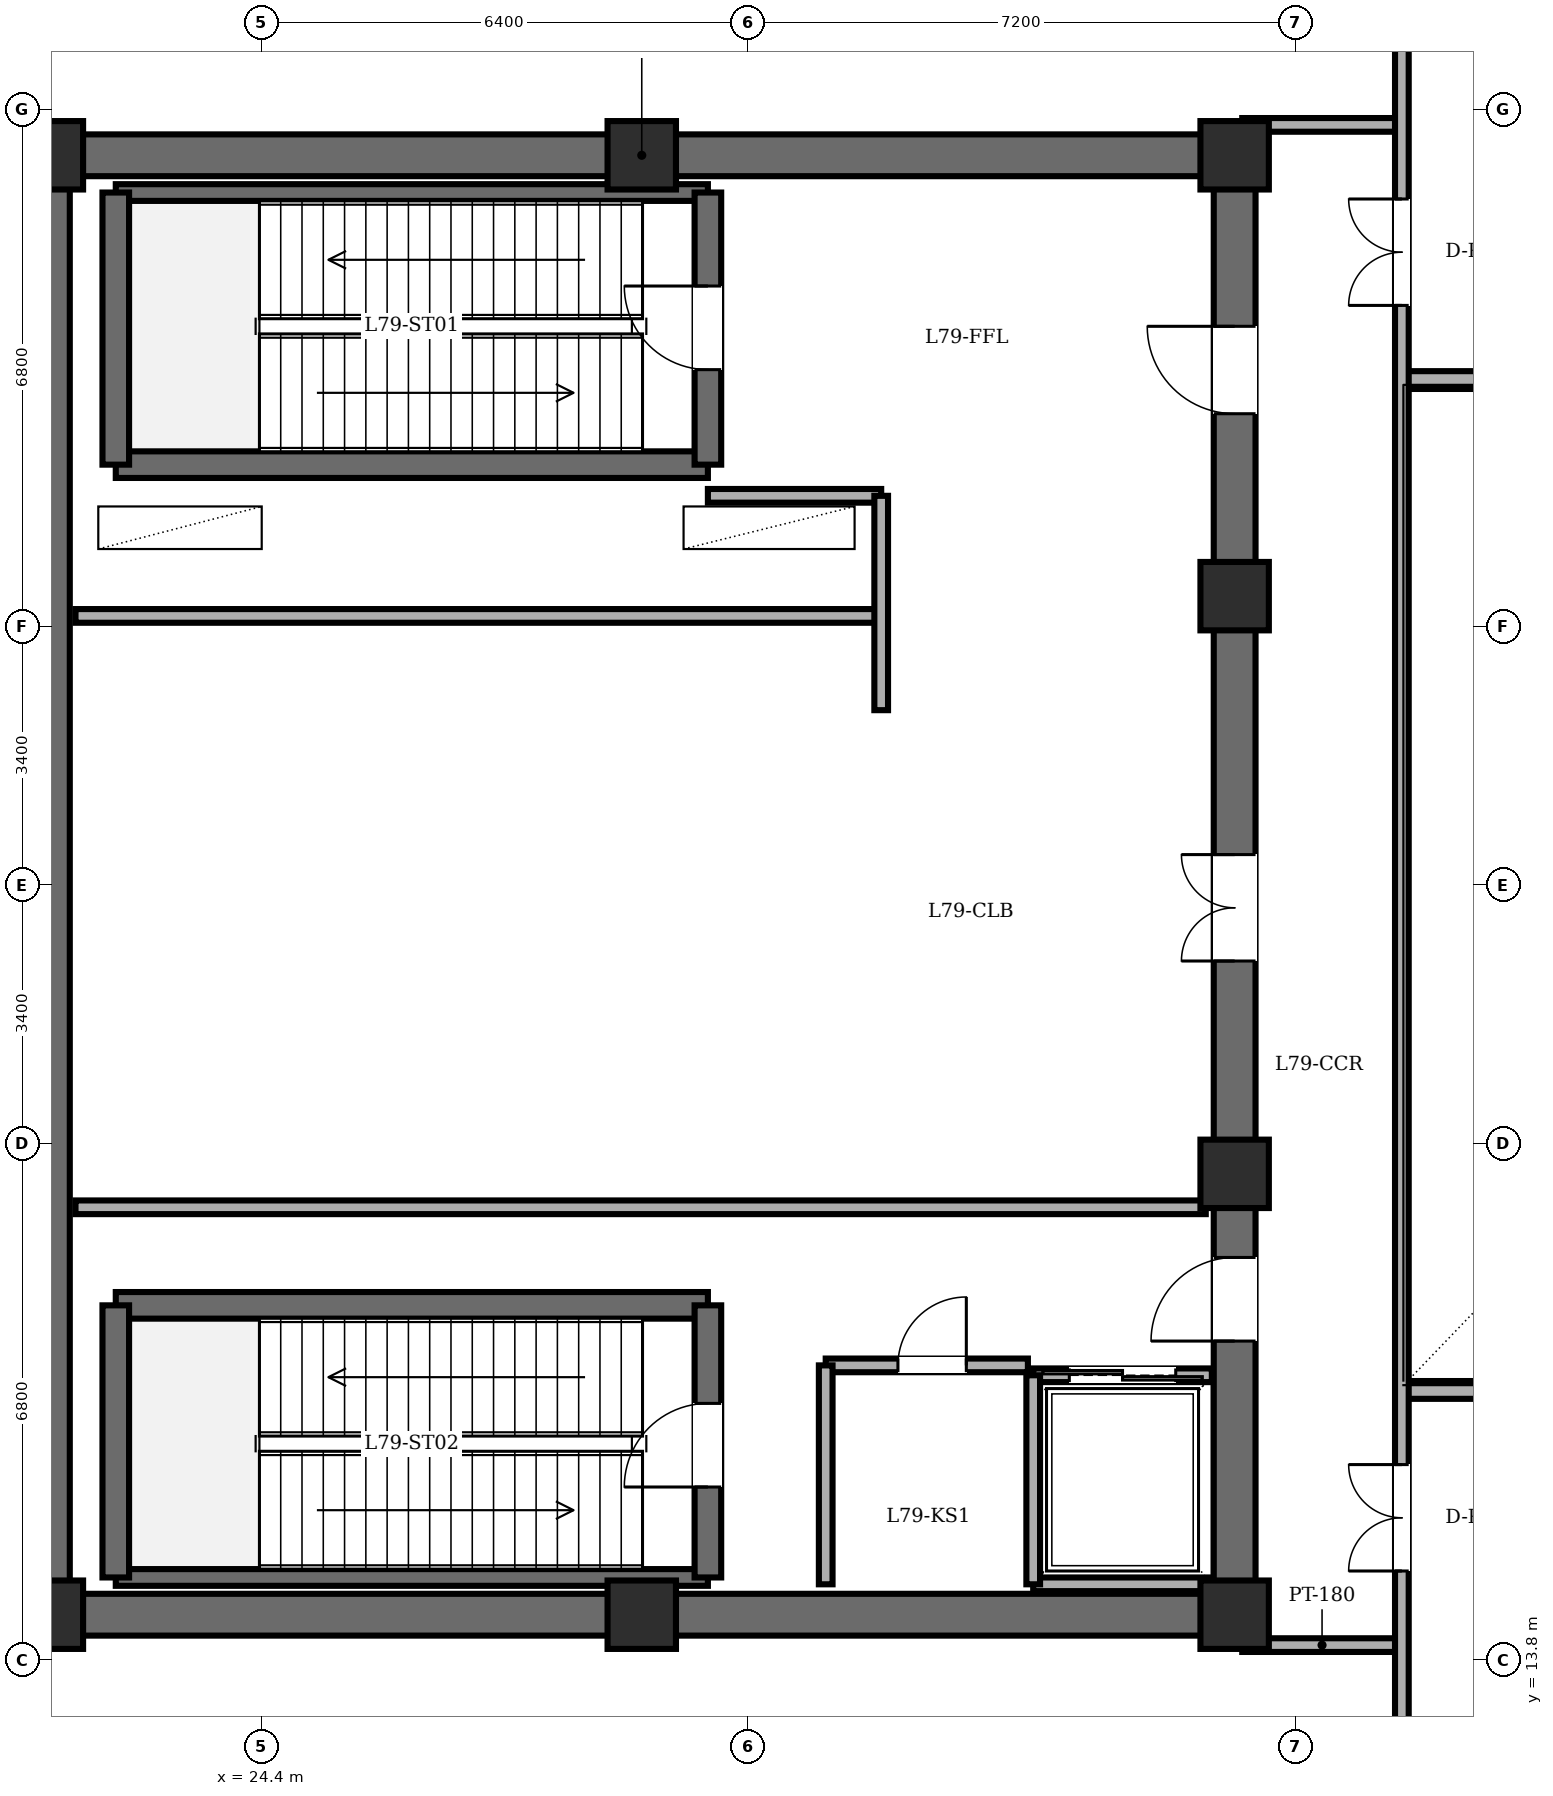
"""IFC4 building model, lengths in metres.
Left out: names, types, materials, properties, quantities, classifications, styles, units other than length and angle.
Written with IfcOpenShell. Run it as: python <this file> out.ifc"""

import sys

from ifc_helpers import new_model, si_unit, direction, frame, frame_2d, origin, origin_2d, place, context, subcontext, project, spatial, rectangle, extrude, element, fill, save


model = new_model("IFC4")
c1 = context("Model", 3, precision=1e-05, world=origin(), true_north=direction((0.0, 1.0)))
c2 = subcontext(c1, "Body", "Model", "MODEL_VIEW")
j1 = project(units=[si_unit("LENGTHUNIT", "METRE"), si_unit("PLANEANGLEUNIT", "RADIAN")], contexts=[c1])
p1 = place(None, origin())
s1 = spatial("IfcSite", under=j1, at=p1, CompositionType="ELEMENT")
p2 = place(p1, origin())
s2 = spatial("IfcBuilding", under=s1, at=p2, CompositionType="ELEMENT")
p3 = place(p2, frame((0.0, 0.0, 308.0)))
s3 = spatial("IfcBuildingStorey", under=s2, at=p3, CompositionType="ELEMENT", Elevation=308.0)
for number, where, z_axis, x_axis in (
    (1, (21.6, 14.4, 0.0), (0.0, 0.0, 1.0), (1.0, 0.0, 0.0)),
    (2, (29.4, 14.4, 0.0), (0.0, 0.0, 1.0), (1.0, 0.0, 0.0)),
    (3, (37.2, 14.4, 0.0), (0.0, 0.0, 1.0), (1.0, 0.0, 0.0)),
    (4, (37.2, 20.2, 0.0), (0.0, 0.0, 1.0), (1.0, 0.0, 0.0)),
    (5, (37.2, 27.8, 0.0), (0.0, 0.0, 1.0), (1.0, 0.0, 0.0)),
    (6, (37.2, 33.6, 0.0), (0.0, 0.0, 1.0), (1.0, 0.0, 0.0)),
    (7, (29.4, 33.6, 0.0), (0.0, 0.0, 1.0), (1.0, 0.0, 0.0)),
    (8, (21.6, 33.6, 0.0), (0.0, 0.0, 1.0), (1.0, 0.0, 0.0)),
):
    element("IfcColumn", number, at=place(p3, frame(where, z_axis=z_axis, x_axis=x_axis)), inside=s3, PredefinedType="COLUMN", context=c2, shape_type="SweptSolid", body=[
        extrude(rectangle(XDim=0.9, YDim=0.9, at=origin_2d()), origin(), (0.0, 0.0, 1.0), 7.2),
    ])
p4 = place(p3, frame((21.6, 14.4, 0.0), z_axis=(0.0, 0.0, 1.0), x_axis=(0.0, 1.0, 0.0)))
e9 = element("IfcWall", 9, at=p4, inside=s3, PredefinedType="SHEAR", context=c2, shape_type="SweptSolid", body=[
    extrude(rectangle(XDim=19.2, YDim=0.55, at=frame_2d((9.6, 0.0))), origin(), (0.0, 0.0, 1.0), 6.95),
])
for number, where, z_axis, x_axis in (
    (10, (21.6, 33.6, 0.0), (0.0, 0.0, 1.0), (1.0, 0.0, 0.0)),
    (11, (37.2, 14.4, 0.0), (0.0, 0.0, 1.0), (-1.0, 0.0, 0.0)),
):
    element("IfcWall", number, at=place(p3, frame(where, z_axis=z_axis, x_axis=x_axis)), inside=s3, PredefinedType="SHEAR", context=c2, shape_type="SweptSolid", body=[
        extrude(rectangle(XDim=15.6, YDim=0.55, at=frame_2d((7.8, 0.0))), origin(), (0.0, 0.0, 1.0), 6.95),
    ])
p5 = place(p3, frame((37.2, 14.4, 0.0), z_axis=(0.0, 0.0, 1.0), x_axis=(0.0, 1.0, 0.0)))
e12 = element("IfcWall", 12, at=p5, inside=s3, PredefinedType="SHEAR", context=c2, shape_type="SweptSolid", body=[
    extrude(rectangle(XDim=19.2, YDim=0.55, at=frame_2d((9.6, 0.0))), origin(), (0.0, 0.0, 1.0), 6.95),
])
p6 = place(p5, frame((15.8, 0.0, 0.0)))
e13 = element("IfcOpeningElement", 13, at=p6, cuts=e12, PredefinedType="OPENING", context=c2, shape_type="SweptSolid", body=[
    extrude(rectangle(XDim=1.15, YDim=2.15, at=frame_2d((0.575, 1.075))), frame((0.0, 0.285, 0.0), z_axis=(0.0, -1.0, 0.0), x_axis=(1.0, 0.0, 0.0)), (0.0, 0.0, 1.0), 0.57),
])
p7 = place(p5, frame((3.6, 0.0, 0.0)))
e14 = element("IfcOpeningElement", 14, at=p7, cuts=e12, PredefinedType="OPENING", context=c2, shape_type="SweptSolid", body=[
    extrude(rectangle(XDim=1.1, YDim=2.15, at=frame_2d((0.55, 1.075))), frame((0.0, 0.285, 0.0), z_axis=(0.0, -1.0, 0.0), x_axis=(1.0, 0.0, 0.0)), (0.0, 0.0, 1.0), 0.57),
])
p8 = place(p5, frame((8.6, 0.0, 0.0)))
e15 = element("IfcOpeningElement", 15, at=p8, cuts=e12, PredefinedType="OPENING", context=c2, shape_type="SweptSolid", body=[
    extrude(rectangle(XDim=1.4, YDim=2.25, at=frame_2d((0.7, 1.125))), frame((0.0, 0.285, 0.0), z_axis=(0.0, -1.0, 0.0), x_axis=(1.0, 0.0, 0.0)), (0.0, 0.0, 1.0), 0.57),
])
p9 = place(p3, frame((22.48, 29.53, 0.0), z_axis=(0.0, 0.0, 1.0), x_axis=(1.0, 0.0, 0.0)))
e16 = element("IfcWall", 16, at=p9, inside=s3, PredefinedType="SOLIDWALL", context=c2, shape_type="SweptSolid", body=[
    extrude(rectangle(XDim=7.79, YDim=0.35, at=frame_2d((3.895, 0.0))), origin(), (0.0, 0.0, 1.0), 6.95),
])
p10 = place(p3, frame((22.48, 33.11, 0.0), z_axis=(0.0, 0.0, 1.0), x_axis=(1.0, 0.0, 0.0)))
e17 = element("IfcWall", 17, at=p10, inside=s3, PredefinedType="PARTITIONING", context=c2, shape_type="SweptSolid", body=[
    extrude(rectangle(XDim=7.79, YDim=0.22, at=frame_2d((3.895, 0.0))), origin(), (0.0, 0.0, 1.0), 6.95),
])
p11 = place(p3, frame((22.48, 29.53, 0.0), z_axis=(0.0, 0.0, 1.0), x_axis=(0.0, 1.0, 0.0)))
e18 = element("IfcWall", 18, at=p11, inside=s3, PredefinedType="SOLIDWALL", context=c2, shape_type="SweptSolid", body=[
    extrude(rectangle(XDim=3.58, YDim=0.35, at=frame_2d((1.79, 0.0))), origin(), (0.0, 0.0, 1.0), 6.95),
])
p12 = place(p3, frame((30.27, 29.53, 0.0), z_axis=(0.0, 0.0, 1.0), x_axis=(0.0, 1.0, 0.0)))
e19 = element("IfcWall", 19, at=p12, inside=s3, PredefinedType="SOLIDWALL", context=c2, shape_type="SweptSolid", body=[
    extrude(rectangle(XDim=3.58, YDim=0.35, at=frame_2d((1.79, 0.0))), origin(), (0.0, 0.0, 1.0), 6.95),
])
p13 = place(p12, frame((1.25, 0.0, 0.0)))
e20 = element("IfcOpeningElement", 20, at=p13, cuts=e19, PredefinedType="OPENING", context=c2, shape_type="SweptSolid", body=[
    extrude(rectangle(XDim=1.1, YDim=2.15, at=frame_2d((0.55, 1.075))), frame((0.0, 0.185, 0.0), z_axis=(0.0, -1.0, 0.0), x_axis=(1.0, 0.0, 0.0)), (0.0, 0.0, 1.0), 0.37),
])
p14 = place(p3, frame((22.48, 18.47, 0.0), z_axis=(0.0, 0.0, 1.0), x_axis=(1.0, 0.0, 0.0)))
e21 = element("IfcWall", 21, at=p14, inside=s3, PredefinedType="SOLIDWALL", context=c2, shape_type="SweptSolid", body=[
    extrude(rectangle(XDim=7.79, YDim=0.35, at=frame_2d((3.895, 0.0))), origin(), (0.0, 0.0, 1.0), 6.95),
])
p15 = place(p3, frame((22.48, 14.89, 0.0), z_axis=(0.0, 0.0, 1.0), x_axis=(1.0, 0.0, 0.0)))
e22 = element("IfcWall", 22, at=p15, inside=s3, PredefinedType="PARTITIONING", context=c2, shape_type="SweptSolid", body=[
    extrude(rectangle(XDim=7.79, YDim=0.22, at=frame_2d((3.895, 0.0))), origin(), (0.0, 0.0, 1.0), 6.95),
])
p16 = place(p3, frame((22.48, 14.89, 0.0), z_axis=(0.0, 0.0, 1.0), x_axis=(0.0, 1.0, 0.0)))
e23 = element("IfcWall", 23, at=p16, inside=s3, PredefinedType="SOLIDWALL", context=c2, shape_type="SweptSolid", body=[
    extrude(rectangle(XDim=3.58, YDim=0.35, at=frame_2d((1.79, 0.0))), origin(), (0.0, 0.0, 1.0), 6.95),
])
p17 = place(p3, frame((30.27, 14.89, 0.0), z_axis=(0.0, 0.0, 1.0), x_axis=(0.0, 1.0, 0.0)))
e24 = element("IfcWall", 24, at=p17, inside=s3, PredefinedType="SOLIDWALL", context=c2, shape_type="SweptSolid", body=[
    extrude(rectangle(XDim=3.58, YDim=0.35, at=frame_2d((1.79, 0.0))), origin(), (0.0, 0.0, 1.0), 6.95),
])
p18 = place(p17, frame((1.19, 0.0, 0.0)))
e25 = element("IfcOpeningElement", 25, at=p18, cuts=e24, PredefinedType="OPENING", context=c2, shape_type="SweptSolid", body=[
    extrude(rectangle(XDim=1.1, YDim=2.15, at=frame_2d((0.55, 1.075))), frame((0.0, 0.185, 0.0), z_axis=(0.0, -1.0, 0.0), x_axis=(1.0, 0.0, 0.0)), (0.0, 0.0, 1.0), 0.37),
])
p19 = place(p3, frame((30.27, 29.12, 0.0), z_axis=(0.0, 0.0, 1.0), x_axis=(1.0, 0.0, 0.0)))
e26 = element("IfcWall", 26, at=p19, inside=s3, PredefinedType="PARTITIONING", context=c2, shape_type="SweptSolid", body=[
    extrude(rectangle(XDim=2.28, YDim=0.18, at=frame_2d((1.14, 0.0))), origin(), (0.0, 0.0, 1.0), 6.95),
])
p20 = place(p3, frame((21.95, 27.54, 0.0), z_axis=(0.0, 0.0, 1.0), x_axis=(1.0, 0.0, 0.0)))
e27 = element("IfcWall", 27, at=p20, inside=s3, PredefinedType="PARTITIONING", context=c2, shape_type="SweptSolid", body=[
    extrude(rectangle(XDim=10.6, YDim=0.18, at=frame_2d((5.3, 0.0))), origin(), (0.0, 0.0, 1.0), 6.95),
])
p21 = place(p3, frame((32.55, 26.3, 0.0), z_axis=(0.0, 0.0, 1.0), x_axis=(0.0, 1.0, 0.0)))
e28 = element("IfcWall", 28, at=p21, inside=s3, PredefinedType="PARTITIONING", context=c2, shape_type="SweptSolid", body=[
    extrude(rectangle(XDim=2.82, YDim=0.18, at=frame_2d((1.41, 0.0))), origin(), (0.0, 0.0, 1.0), 6.95),
])
p22 = place(p3, frame((21.95, 19.76, 0.0), z_axis=(0.0, 0.0, 1.0), x_axis=(1.0, 0.0, 0.0)))
e29 = element("IfcWall", 29, at=p22, inside=s3, PredefinedType="PARTITIONING", context=c2, shape_type="SweptSolid", body=[
    extrude(rectangle(XDim=14.87, YDim=0.18, at=frame_2d((7.435, 0.0))), origin(), (0.0, 0.0, 1.0), 6.95),
])
p23 = place(p3, frame((31.82, 17.68, 0.0), z_axis=(0.0, 0.0, 1.0), x_axis=(1.0, 0.0, 0.0)))
e30 = element("IfcWall", 30, at=p23, inside=s3, PredefinedType="PARTITIONING", context=c2, shape_type="SweptSolid", body=[
    extrude(rectangle(XDim=2.66, YDim=0.18, at=frame_2d((1.33, 0.0))), origin(), (0.0, 0.0, 1.0), 6.95),
])
p24 = place(p23, frame((0.95, 0.0, 0.0)))
e31 = element("IfcOpeningElement", 31, at=p24, cuts=e30, PredefinedType="OPENING", context=c2, shape_type="SweptSolid", body=[
    extrude(rectangle(XDim=0.9, YDim=2.05, at=frame_2d((0.45, 1.025))), frame((0.0, 0.1, 0.0), z_axis=(0.0, -1.0, 0.0), x_axis=(1.0, 0.0, 0.0)), (0.0, 0.0, 1.0), 0.2),
])
p25 = place(p3, frame((31.82, 14.8, 0.0), z_axis=(0.0, 0.0, 1.0), x_axis=(0.0, 1.0, 0.0)))
e32 = element("IfcWall", 32, at=p25, inside=s3, PredefinedType="PARTITIONING", context=c2, shape_type="SweptSolid", body=[
    extrude(rectangle(XDim=2.88, YDim=0.18, at=frame_2d((1.44, 0.0))), origin(), (0.0, 0.0, 1.0), 6.95),
])
p26 = place(p3, frame((34.55, 17.55, 0.0), z_axis=(0.0, 0.0, 1.0), x_axis=(1.0, 0.0, 0.0)))
e33 = element("IfcWall", 33, at=p26, inside=s3, PredefinedType="PARTITIONING", context=c2, shape_type="SweptSolid", body=[
    extrude(rectangle(XDim=2.35, YDim=0.18, at=frame_2d((1.175, 0.0))), origin(), (0.0, 0.0, 1.0), 6.95),
])
p27 = place(p26, frame((0.475, 0.0, 0.0)))
e34 = element("IfcOpeningElement", 34, at=p27, cuts=e33, PredefinedType="OPENING", context=c2, shape_type="SweptSolid", body=[
    extrude(rectangle(XDim=1.4, YDim=2.3, at=frame_2d((0.7, 1.15))), frame((0.0, 0.1, 0.0), z_axis=(0.0, -1.0, 0.0), x_axis=(1.0, 0.0, 0.0)), (0.0, 0.0, 1.0), 0.2),
])
p28 = place(p3, frame((36.9, 14.8, 0.0), z_axis=(0.0, 0.0, 1.0), x_axis=(-1.0, 0.0, 0.0)))
e35 = element("IfcWall", 35, at=p28, inside=s3, PredefinedType="PARTITIONING", context=c2, shape_type="SweptSolid", body=[
    extrude(rectangle(XDim=2.35, YDim=0.18, at=frame_2d((1.175, 0.0))), origin(), (0.0, 0.0, 1.0), 6.95),
])
p29 = place(p3, frame((34.55, 17.55, 0.0), z_axis=(0.0, 0.0, 1.0), x_axis=(0.0, -1.0, 0.0)))
e36 = element("IfcWall", 36, at=p29, inside=s3, PredefinedType="PARTITIONING", context=c2, shape_type="SweptSolid", body=[
    extrude(rectangle(XDim=2.75, YDim=0.18, at=frame_2d((1.375, 0.0))), origin(), (0.0, 0.0, 1.0), 6.95),
])
p30 = place(p3, frame((37.3, 14.0, 0.0), z_axis=(0.0, 0.0, 1.0), x_axis=(1.0, 0.0, 0.0)))
e37 = element("IfcWall", 37, at=p30, inside=s3, PredefinedType="PARTITIONING", context=c2, shape_type="SweptSolid", body=[
    extrude(rectangle(XDim=2.1, YDim=0.18, at=frame_2d((1.05, 0.0))), origin(), (0.0, 0.0, 1.0), 6.95),
])
p31 = place(p3, frame((39.4, 17.35, 0.0), z_axis=(0.0, 0.0, 1.0), x_axis=(1.0, 0.0, 0.0)))
e38 = element("IfcWall", 38, at=p31, inside=s3, PredefinedType="PARTITIONING", context=c2, shape_type="SweptSolid", body=[
    extrude(rectangle(XDim=29.788, YDim=0.22, at=frame_2d((14.894, 0.0))), origin(), (0.0, 0.0, 1.0), 6.432),
])
p32 = place(p3, frame((39.4, 30.65, 0.0), z_axis=(0.0, 0.0, 1.0), x_axis=(1.0, 0.0, 0.0)))
e39 = element("IfcWall", 39, at=p32, inside=s3, PredefinedType="PARTITIONING", context=c2, shape_type="SweptSolid", body=[
    extrude(rectangle(XDim=29.788, YDim=0.22, at=frame_2d((14.894, 0.0))), origin(), (0.0, 0.0, 1.0), 6.432),
])
p33 = place(p32, frame((21.336, 0.0, 0.0)))
e40 = element("IfcOpeningElement", 40, at=p33, cuts=e39, PredefinedType="OPENING", context=c2, shape_type="SweptSolid", body=[
    extrude(rectangle(XDim=1.4, YDim=2.25, at=frame_2d((0.7, 1.125))), frame((0.0, 0.12, 0.0), z_axis=(0.0, -1.0, 0.0), x_axis=(1.0, 0.0, 0.0)), (0.0, 0.0, 1.0), 0.24),
])
p34 = place(p3, frame((37.3, 34.0, 0.0), z_axis=(0.0, 0.0, 1.0), x_axis=(1.0, 0.0, 0.0)))
e41 = element("IfcWall", 41, at=p34, inside=s3, PredefinedType="PARTITIONING", context=c2, shape_type="SweptSolid", body=[
    extrude(rectangle(XDim=2.1, YDim=0.18, at=frame_2d((1.05, 0.0))), origin(), (0.0, 0.0, 1.0), 6.95),
])
p35 = place(p3, frame((39.4, 10.6, 0.0), z_axis=(0.0, 0.0, 1.0), x_axis=(0.0, 1.0, 0.0)))
e42 = element("IfcWall", 42, at=p35, inside=s3, PredefinedType="PARTITIONING", context=c2, shape_type="SweptSolid", body=[
    extrude(rectangle(XDim=26.8, YDim=0.18, at=frame_2d((13.4, 0.0))), origin(), (0.0, 0.0, 1.0), 6.95),
])
p36 = place(p35, frame((21.025, 0.0, 0.0)))
e43 = element("IfcOpeningElement", 43, at=p36, cuts=e42, PredefinedType="OPENING", context=c2, shape_type="SweptSolid", body=[
    extrude(rectangle(XDim=1.4, YDim=2.25, at=frame_2d((0.7, 1.125))), frame((0.0, 0.1, 0.0), z_axis=(0.0, -1.0, 0.0), x_axis=(1.0, 0.0, 0.0)), (0.0, 0.0, 1.0), 0.2),
])
p37 = place(p35, frame((4.375, 0.0, 0.0)))
e44 = element("IfcOpeningElement", 44, at=p37, cuts=e42, PredefinedType="OPENING", context=c2, shape_type="SweptSolid", body=[
    extrude(rectangle(XDim=1.4, YDim=2.25, at=frame_2d((0.7, 1.125))), frame((0.0, 0.1, 0.0), z_axis=(0.0, -1.0, 0.0), x_axis=(1.0, 0.0, 0.0)), (0.0, 0.0, 1.0), 0.2),
])
p38 = place(p13, origin())
e45 = element("IfcDoor", 45, at=p38, inside=s3, OperationType="SINGLE_SWING_RIGHT", PredefinedType="DOOR", context=c2, shape_type="SweptSolid", body=[
    extrude(rectangle(XDim=1.1, YDim=2.15, at=frame_2d((0.55, 1.075))), frame((0.0, 0.025, 0.0), z_axis=(0.0, -1.0, 0.0), x_axis=(1.0, 0.0, 0.0)), (0.0, 0.0, 1.0), 0.05),
])
fill(e20, e45)
p39 = place(p18, origin())
e46 = element("IfcDoor", 46, at=p39, inside=s3, OperationType="SINGLE_SWING_LEFT", PredefinedType="DOOR", context=c2, shape_type="SweptSolid", body=[
    extrude(rectangle(XDim=1.1, YDim=2.15, at=frame_2d((0.55, 1.075))), frame((0.0, 0.025, 0.0), z_axis=(0.0, -1.0, 0.0), x_axis=(1.0, 0.0, 0.0)), (0.0, 0.0, 1.0), 0.05),
])
fill(e25, e46)
p40 = place(p6, origin())
e47 = element("IfcDoor", 47, at=p40, inside=s3, OperationType="SINGLE_SWING_RIGHT", PredefinedType="DOOR", context=c2, shape_type="SweptSolid", body=[
    extrude(rectangle(XDim=1.15, YDim=2.15, at=frame_2d((0.575, 1.075))), frame((0.0, 0.025, 0.0), z_axis=(0.0, -1.0, 0.0), x_axis=(1.0, 0.0, 0.0)), (0.0, 0.0, 1.0), 0.05),
])
fill(e13, e47)
p41 = place(p7, origin())
e48 = element("IfcDoor", 48, at=p41, inside=s3, OperationType="SINGLE_SWING_LEFT", PredefinedType="DOOR", context=c2, shape_type="SweptSolid", body=[
    extrude(rectangle(XDim=1.1, YDim=2.15, at=frame_2d((0.55, 1.075))), frame((0.0, 0.025, 0.0), z_axis=(0.0, -1.0, 0.0), x_axis=(1.0, 0.0, 0.0)), (0.0, 0.0, 1.0), 0.05),
])
fill(e14, e48)
p42 = place(p24, origin())
e49 = element("IfcDoor", 49, at=p42, inside=s3, OperationType="SINGLE_SWING_RIGHT", PredefinedType="DOOR", context=c2, shape_type="SweptSolid", body=[
    extrude(rectangle(XDim=0.9, YDim=2.05, at=frame_2d((0.45, 1.025))), frame((0.0, 0.025, 0.0), z_axis=(0.0, -1.0, 0.0), x_axis=(1.0, 0.0, 0.0)), (0.0, 0.0, 1.0), 0.05),
])
fill(e31, e49)
p43 = place(p27, origin())
e50 = element("IfcDoor", 50, at=p43, inside=s3, OperationType="DOUBLE_DOOR_SLIDING", PredefinedType="DOOR", context=c2, shape_type="SweptSolid", body=[
    extrude(rectangle(XDim=1.4, YDim=2.3, at=frame_2d((0.7, 1.15))), frame((0.0, 0.025, 0.0), z_axis=(0.0, -1.0, 0.0), x_axis=(1.0, 0.0, 0.0)), (0.0, 0.0, 1.0), 0.05),
])
fill(e34, e50)
p44 = place(p8, origin())
e51 = element("IfcDoor", 51, at=p44, inside=s3, OperationType="DOUBLE_DOOR_SINGLE_SWING", PredefinedType="DOOR", context=c2, shape_type="SweptSolid", body=[
    extrude(rectangle(XDim=1.4, YDim=2.25, at=frame_2d((0.7, 1.125))), frame((0.0, 0.025, 0.0), z_axis=(0.0, -1.0, 0.0), x_axis=(1.0, 0.0, 0.0)), (0.0, 0.0, 1.0), 0.05),
])
fill(e15, e51)
p45 = place(p36, origin())
e52 = element("IfcDoor", 52, at=p45, inside=s3, OperationType="DOUBLE_DOOR_SINGLE_SWING", PredefinedType="DOOR", context=c2, shape_type="SweptSolid", body=[
    extrude(rectangle(XDim=1.4, YDim=2.25, at=frame_2d((0.7, 1.125))), frame((0.0, 0.025, 0.0), z_axis=(0.0, -1.0, 0.0), x_axis=(1.0, 0.0, 0.0)), (0.0, 0.0, 1.0), 0.05),
])
fill(e43, e52)
p46 = place(p37, origin())
e53 = element("IfcDoor", 53, at=p46, inside=s3, OperationType="DOUBLE_DOOR_SINGLE_SWING", PredefinedType="DOOR", context=c2, shape_type="SweptSolid", body=[
    extrude(rectangle(XDim=1.4, YDim=2.25, at=frame_2d((0.7, 1.125))), frame((0.0, 0.025, 0.0), z_axis=(0.0, -1.0, 0.0), x_axis=(1.0, 0.0, 0.0)), (0.0, 0.0, 1.0), 0.05),
])
fill(e44, e53)
save(model, sys.argv[1])
